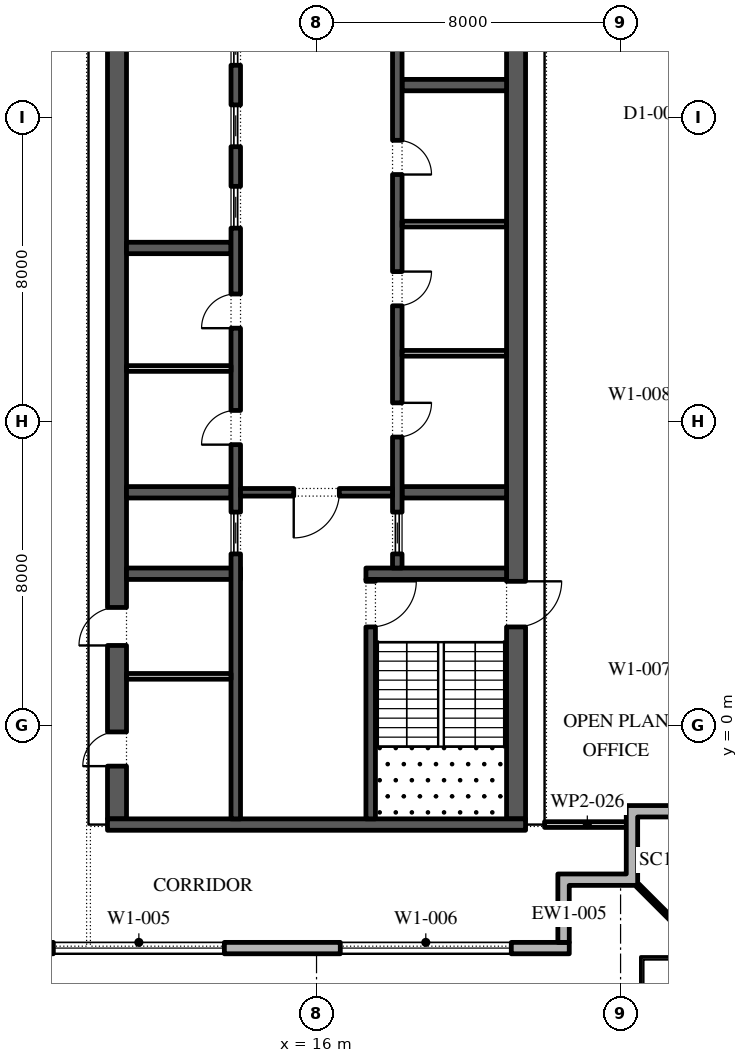
"""IFC4 building model, lengths in metres.
Left out: names, types, materials, properties, quantities, classifications, styles, units other than length and angle.
Written with IfcOpenShell. Run it as: python <this file> out.ifc"""

import sys

from ifc_helpers import new_model, si_unit, direction, frame, frame_2d, origin, place, context, subcontext, project, spatial, polyline, rectangle, outline, extrude, element, fill, save


model = new_model("IFC4")
c1 = context("Model", 3, precision=1e-05, world=origin(), true_north=direction((0.0, 1.0)))
c2 = subcontext(c1, "Body", "Model", "MODEL_VIEW")
j1 = project(units=[si_unit("LENGTHUNIT", "METRE"), si_unit("PLANEANGLEUNIT", "RADIAN")], contexts=[c1])
p1 = place(None, origin())
s1 = spatial("IfcSite", under=j1, at=p1, CompositionType="ELEMENT")
p2 = place(p1, origin())
s2 = spatial("IfcBuilding", under=s1, at=p2, CompositionType="ELEMENT")
p3 = place(p2, frame((0.0, 0.0, 309.0)))
s3 = spatial("IfcBuildingStorey", under=s2, at=p3, CompositionType="ELEMENT", Elevation=309.0)
p4 = place(p3, frame((-22.35, -5.85, 0.0), z_axis=(0.0, 0.0, 1.0), x_axis=(1.0, 0.0, 0.0)))
e1 = element("IfcWall", 1, at=p4, inside=s3, PredefinedType="STANDARD", context=c2, shape_type="SweptSolid", body=[
    extrude(rectangle(XDim=45.0, YDim=0.3, at=frame_2d((22.5, 0.0))), origin(), (0.0, 0.0, 1.0), 4.0),
])
p5 = place(p4, frame((1.375, 0.0, 0.45)))
e2 = element("IfcOpeningElement", 2, at=p5, cuts=e1, PredefinedType="OPENING", context=c2, shape_type="SweptSolid", body=[
    extrude(rectangle(XDim=4.5, YDim=3.05, at=frame_2d((2.25, 1.525))), frame((0.0, 0.16, 0.0), z_axis=(0.0, -1.0, 0.0), x_axis=(1.0, 0.0, 0.0)), (0.0, 0.0, 1.0), 0.32),
])
p6 = place(p4, frame((8.775, 0.0, 0.45)))
e3 = element("IfcOpeningElement", 3, at=p6, cuts=e1, PredefinedType="OPENING", context=c2, shape_type="SweptSolid", body=[
    extrude(rectangle(XDim=4.5, YDim=3.05, at=frame_2d((2.25, 1.525))), frame((0.0, 0.16, 0.0), z_axis=(0.0, -1.0, 0.0), x_axis=(1.0, 0.0, 0.0)), (0.0, 0.0, 1.0), 0.32),
])
p7 = place(p4, frame((17.375, 0.0, 0.0)))
e4 = element("IfcOpeningElement", 4, at=p7, cuts=e1, PredefinedType="OPENING", context=c2, shape_type="SweptSolid", body=[
    extrude(rectangle(XDim=2.4, YDim=3.5, at=frame_2d((1.2, 1.75))), frame((0.0, 0.16, 0.0), z_axis=(0.0, -1.0, 0.0), x_axis=(1.0, 0.0, 0.0)), (0.0, 0.0, 1.0), 0.32),
])
p8 = place(p4, frame((23.875, 0.0, 0.45)))
e5 = element("IfcOpeningElement", 5, at=p8, cuts=e1, PredefinedType="OPENING", context=c2, shape_type="SweptSolid", body=[
    extrude(rectangle(XDim=4.5, YDim=3.05, at=frame_2d((2.25, 1.525))), frame((0.0, 0.16, 0.0), z_axis=(0.0, -1.0, 0.0), x_axis=(1.0, 0.0, 0.0)), (0.0, 0.0, 1.0), 0.32),
])
p9 = place(p4, frame((31.425, 0.0, 0.45)))
e6 = element("IfcOpeningElement", 6, at=p9, cuts=e1, PredefinedType="OPENING", context=c2, shape_type="SweptSolid", body=[
    extrude(rectangle(XDim=4.5, YDim=3.05, at=frame_2d((2.25, 1.525))), frame((0.0, 0.16, 0.0), z_axis=(0.0, -1.0, 0.0), x_axis=(1.0, 0.0, 0.0)), (0.0, 0.0, 1.0), 0.32),
])
p10 = place(p4, frame((38.975, 0.0, 0.45)))
e7 = element("IfcOpeningElement", 7, at=p10, cuts=e1, PredefinedType="OPENING", context=c2, shape_type="SweptSolid", body=[
    extrude(rectangle(XDim=4.5, YDim=3.05, at=frame_2d((2.25, 1.525))), frame((0.0, 0.16, 0.0), z_axis=(0.0, -1.0, 0.0), x_axis=(1.0, 0.0, 0.0)), (0.0, 0.0, 1.0), 0.32),
])
p11 = place(p3, origin())
e8 = element("IfcWall", 8, at=p11, inside=s3, PredefinedType="STANDARD", context=c2, shape_type="SweptSolid", body=[
    extrude(outline(polyline([(24.15, -3.9), (24.15, -2.1), (26.25, -2.1), (26.25, -2.4), (24.45, -2.4), (24.45, -4.2), (22.65, -4.2), (22.65, -5.7), (22.35, -5.7), (22.35, -3.9), (24.15, -3.9)])), origin(), (0.0, 0.0, 1.0), 4.0),
])
p12 = place(p3, frame((24.45, -4.2, -0.05), z_axis=(0.0, 0.0, 1.0), x_axis=(0.707106781187, -0.707106781187, 0.0)))
e9 = element("IfcWall", 9, at=p12, inside=s3, PredefinedType="STANDARD", context=c2, shape_type="SweptSolid", body=[
    extrude(rectangle(XDim=2.667, YDim=0.1, at=frame_2d((1.333, 0.0))), origin(), (0.0, 0.0, 1.0), 4.05),
])
p13 = place(p3, frame((21.25, -2.45, 0.0), z_axis=(0.0, 0.0, 1.0), x_axis=(0.0, 1.0, 0.0)))
e10 = element("IfcWall", 10, at=p13, inside=s3, PredefinedType="SHEAR", context=c2, shape_type="SweptSolid", body=[
    extrude(rectangle(XDim=27.9, YDim=0.5, at=frame_2d((13.95, 0.0))), origin(), (0.0, 0.0, 1.0), 4.0),
])
p14 = place(p13, frame((5.05, 0.0, 0.0)))
e11 = element("IfcOpeningElement", 11, at=p14, cuts=e10, PredefinedType="OPENING", context=c2, shape_type="SweptSolid", body=[
    extrude(rectangle(XDim=1.2, YDim=2.1, at=frame_2d((0.6, 1.05))), frame((0.0, 0.26, 0.0), z_axis=(0.0, -1.0, 0.0), x_axis=(1.0, 0.0, 0.0)), (0.0, 0.0, 1.0), 0.52),
])
p15 = place(p13, frame((21.65, 0.0, 0.0)))
e12 = element("IfcOpeningElement", 12, at=p15, cuts=e10, PredefinedType="OPENING", context=c2, shape_type="SweptSolid", body=[
    extrude(rectangle(XDim=1.2, YDim=2.1, at=frame_2d((0.6, 1.05))), frame((0.0, 0.26, 0.0), z_axis=(0.0, -1.0, 0.0), x_axis=(1.0, 0.0, 0.0)), (0.0, 0.0, 1.0), 0.52),
])
p16 = place(p3, frame((10.75, -2.45, 0.0), z_axis=(0.0, 0.0, 1.0), x_axis=(0.0, 1.0, 0.0)))
e13 = element("IfcWall", 13, at=p16, inside=s3, PredefinedType="SHEAR", context=c2, shape_type="SweptSolid", body=[
    extrude(rectangle(XDim=27.9, YDim=0.5, at=frame_2d((13.95, 0.0))), origin(), (0.0, 0.0, 1.0), 4.0),
])
p17 = place(p16, frame((23.65, 0.0, 0.0)))
e14 = element("IfcOpeningElement", 14, at=p17, cuts=e13, PredefinedType="OPENING", context=c2, shape_type="SweptSolid", body=[
    extrude(rectangle(XDim=2.4, YDim=2.1, at=frame_2d((1.2, 1.05))), frame((0.0, 0.26, 0.0), z_axis=(0.0, -1.0, 0.0), x_axis=(1.0, 0.0, 0.0)), (0.0, 0.0, 1.0), 0.52),
])
p18 = place(p16, frame((1.387, 0.0, 0.0)))
e15 = element("IfcOpeningElement", 15, at=p18, cuts=e13, PredefinedType="OPENING", context=c2, shape_type="SweptSolid", body=[
    extrude(rectangle(XDim=0.9, YDim=2.1, at=frame_2d((0.45, 1.05))), frame((0.0, 0.26, 0.0), z_axis=(0.0, -1.0, 0.0), x_axis=(1.0, 0.0, 0.0)), (0.0, 0.0, 1.0), 0.52),
])
p19 = place(p16, frame((4.562, 0.0, 0.0)))
e16 = element("IfcOpeningElement", 16, at=p19, cuts=e13, PredefinedType="OPENING", context=c2, shape_type="SweptSolid", body=[
    extrude(rectangle(XDim=1.0, YDim=2.1, at=frame_2d((0.5, 1.05))), frame((0.0, 0.26, 0.0), z_axis=(0.0, -1.0, 0.0), x_axis=(1.0, 0.0, 0.0)), (0.0, 0.0, 1.0), 0.52),
])
p20 = place(p3, frame((10.5, -2.6, 0.0), z_axis=(0.0, 0.0, 1.0), x_axis=(1.0, 0.0, 0.0)))
e17 = element("IfcWall", 17, at=p20, inside=s3, PredefinedType="SHEAR", context=c2, shape_type="SweptSolid", body=[
    extrude(rectangle(XDim=11.0, YDim=0.3, at=frame_2d((5.5, 0.0))), origin(), (0.0, 0.0, 1.0), 4.0),
])
p21 = place(p3, frame((17.3, 4.0, 0.0), z_axis=(0.0, 0.0, 1.0), x_axis=(1.0, 0.0, 0.0)))
e18 = element("IfcWall", 18, at=p21, inside=s3, PredefinedType="SHEAR", context=c2, shape_type="SweptSolid", body=[
    extrude(rectangle(XDim=3.7, YDim=0.3, at=frame_2d((1.85, 0.0))), origin(), (0.0, 0.0, 1.0), 4.0),
])
p22 = place(p3, frame((17.425, -2.45, 0.0), z_axis=(0.0, 0.0, 1.0), x_axis=(0.0, 1.0, 0.0)))
e19 = element("IfcWall", 19, at=p22, inside=s3, PredefinedType="SHEAR", context=c2, shape_type="SweptSolid", body=[
    extrude(rectangle(XDim=6.3, YDim=0.25, at=frame_2d((3.15, 0.0))), origin(), (0.0, 0.0, 1.0), 4.0),
])
p23 = place(p22, frame((5.05, 0.0, 0.0)))
e20 = element("IfcOpeningElement", 20, at=p23, cuts=e19, PredefinedType="OPENING", context=c2, shape_type="SweptSolid", body=[
    extrude(rectangle(XDim=1.2, YDim=2.1, at=frame_2d((0.6, 1.05))), frame((0.0, 0.135, 0.0), z_axis=(0.0, -1.0, 0.0), x_axis=(1.0, 0.0, 0.0)), (0.0, 0.0, 1.0), 0.27),
])
for number, where, z_axis, x_axis in (
    (21, (18.25, 6.143, 0.0), (0.0, 0.0, 1.0), (1.0, 0.0, 0.0)),
    (22, (18.25, 16.857, 0.0), (0.0, 0.0, 1.0), (1.0, 0.0, 0.0)),
):
    element("IfcWall", number, at=place(p3, frame(where, z_axis=z_axis, x_axis=x_axis)), inside=s3, PredefinedType="SHEAR", context=c2, shape_type="SweptSolid", body=[
        extrude(rectangle(XDim=2.75, YDim=0.3, at=frame_2d((1.375, 0.0))), origin(), (0.0, 0.0, 1.0), 4.0),
    ])
p24 = place(p3, frame((18.125, 4.15, 0.0), z_axis=(0.0, 0.0, 1.0), x_axis=(0.0, 1.0, 0.0)))
e23 = element("IfcWall", 23, at=p24, inside=s3, PredefinedType="SHEAR", context=c2, shape_type="SweptSolid", body=[
    extrude(rectangle(XDim=14.7, YDim=0.25, at=frame_2d((7.35, 0.0))), origin(), (0.0, 0.0, 1.0), 4.0),
])
p25 = place(p24, frame((3.446, 0.0, 0.0)))
e24 = element("IfcOpeningElement", 24, at=p25, cuts=e23, PredefinedType="OPENING", context=c2, shape_type="SweptSolid", body=[
    extrude(rectangle(XDim=0.9, YDim=2.1, at=frame_2d((0.45, 1.05))), frame((0.0, 0.135, 0.0), z_axis=(0.0, -1.0, 0.0), x_axis=(1.0, 0.0, 0.0)), (0.0, 0.0, 1.0), 0.27),
])
p26 = place(p24, frame((6.9, 0.0, 0.0)))
e25 = element("IfcOpeningElement", 25, at=p26, cuts=e23, PredefinedType="OPENING", context=c2, shape_type="SweptSolid", body=[
    extrude(rectangle(XDim=0.9, YDim=2.1, at=frame_2d((0.45, 1.05))), frame((0.0, 0.135, 0.0), z_axis=(0.0, -1.0, 0.0), x_axis=(1.0, 0.0, 0.0)), (0.0, 0.0, 1.0), 0.27),
])
p27 = place(p24, frame((10.354, 0.0, 0.0)))
e26 = element("IfcOpeningElement", 26, at=p27, cuts=e23, PredefinedType="OPENING", context=c2, shape_type="SweptSolid", body=[
    extrude(rectangle(XDim=0.9, YDim=2.1, at=frame_2d((0.45, 1.05))), frame((0.0, 0.135, 0.0), z_axis=(0.0, -1.0, 0.0), x_axis=(1.0, 0.0, 0.0)), (0.0, 0.0, 1.0), 0.27),
])
p28 = place(p24, frame((0.371, 0.0, 0.0)))
e27 = element("IfcOpeningElement", 27, at=p28, cuts=e23, PredefinedType="OPENING", context=c2, shape_type="SweptSolid", body=[
    extrude(rectangle(XDim=1.1, YDim=2.1, at=frame_2d((0.55, 1.05))), frame((0.0, 0.135, 0.0), z_axis=(0.0, -1.0, 0.0), x_axis=(1.0, 0.0, 0.0)), (0.0, 0.0, 1.0), 0.27),
])
for number, where, z_axis, x_axis in (
    (28, (18.25, 9.8, 0.0), (0.0, 0.0, 1.0), (1.0, 0.0, 0.0)),
    (29, (18.25, 13.2, 0.0), (0.0, 0.0, 1.0), (1.0, 0.0, 0.0)),
):
    element("IfcWall", number, at=place(p3, frame(where, z_axis=z_axis, x_axis=x_axis)), inside=s3, PredefinedType="PARTITIONING", context=c2, shape_type="SweptSolid", body=[
        extrude(rectangle(XDim=2.75, YDim=0.15, at=frame_2d((1.375, 0.0))), origin(), (0.0, 0.0, 1.0), 4.0),
    ])
p29 = place(p3, frame((11.0, 4.0, 0.0), z_axis=(0.0, 0.0, 1.0), x_axis=(1.0, 0.0, 0.0)))
e30 = element("IfcWall", 30, at=p29, inside=s3, PredefinedType="SHEAR", context=c2, shape_type="SweptSolid", body=[
    extrude(rectangle(XDim=3.0, YDim=0.3, at=frame_2d((1.5, 0.0))), origin(), (0.0, 0.0, 1.0), 4.0),
])
for number, where, z_axis, x_axis in (
    (31, (11.0, 6.143, 0.0), (0.0, 0.0, 1.0), (1.0, 0.0, 0.0)),
    (32, (11.0, 12.571, 0.0), (0.0, 0.0, 1.0), (1.0, 0.0, 0.0)),
):
    element("IfcWall", number, at=place(p3, frame(where, z_axis=z_axis, x_axis=x_axis)), inside=s3, PredefinedType="SHEAR", context=c2, shape_type="SweptSolid", body=[
        extrude(rectangle(XDim=2.75, YDim=0.3, at=frame_2d((1.375, 0.0))), origin(), (0.0, 0.0, 1.0), 4.0),
    ])
p30 = place(p3, frame((13.875, -2.45, 0.0), z_axis=(0.0, 0.0, 1.0), x_axis=(0.0, 1.0, 0.0)))
e33 = element("IfcWall", 33, at=p30, inside=s3, PredefinedType="SHEAR", context=c2, shape_type="SweptSolid", body=[
    extrude(rectangle(XDim=21.3, YDim=0.25, at=frame_2d((10.65, 0.0))), origin(), (0.0, 0.0, 1.0), 4.0),
])
p31 = place(p30, frame((9.846, 0.0, 0.0)))
e34 = element("IfcOpeningElement", 34, at=p31, cuts=e33, PredefinedType="OPENING", context=c2, shape_type="SweptSolid", body=[
    extrude(rectangle(XDim=0.9, YDim=2.1, at=frame_2d((0.45, 1.05))), frame((0.0, 0.135, 0.0), z_axis=(0.0, -1.0, 0.0), x_axis=(1.0, 0.0, 0.0)), (0.0, 0.0, 1.0), 0.27),
])
p32 = place(p30, frame((12.911, 0.0, 0.0)))
e35 = element("IfcOpeningElement", 35, at=p32, cuts=e33, PredefinedType="OPENING", context=c2, shape_type="SweptSolid", body=[
    extrude(rectangle(XDim=0.9, YDim=2.1, at=frame_2d((0.45, 1.05))), frame((0.0, 0.135, 0.0), z_axis=(0.0, -1.0, 0.0), x_axis=(1.0, 0.0, 0.0)), (0.0, 0.0, 1.0), 0.27),
])
p33 = place(p30, frame((6.971, 0.0, 0.0)))
e36 = element("IfcOpeningElement", 36, at=p33, cuts=e33, PredefinedType="OPENING", context=c2, shape_type="SweptSolid", body=[
    extrude(rectangle(XDim=1.1, YDim=2.1, at=frame_2d((0.55, 1.05))), frame((0.0, 0.135, 0.0), z_axis=(0.0, -1.0, 0.0), x_axis=(1.0, 0.0, 0.0)), (0.0, 0.0, 1.0), 0.27),
])
p34 = place(p30, frame((15.543, 0.0, 0.0)))
e37 = element("IfcOpeningElement", 37, at=p34, cuts=e33, PredefinedType="OPENING", context=c2, shape_type="SweptSolid", body=[
    extrude(rectangle(XDim=1.1, YDim=2.1, at=frame_2d((0.55, 1.05))), frame((0.0, 0.135, 0.0), z_axis=(0.0, -1.0, 0.0), x_axis=(1.0, 0.0, 0.0)), (0.0, 0.0, 1.0), 0.27),
])
p35 = place(p30, frame((17.686, 0.0, 0.0)))
e38 = element("IfcOpeningElement", 38, at=p35, cuts=e33, PredefinedType="OPENING", context=c2, shape_type="SweptSolid", body=[
    extrude(rectangle(XDim=1.1, YDim=2.1, at=frame_2d((0.55, 1.05))), frame((0.0, 0.135, 0.0), z_axis=(0.0, -1.0, 0.0), x_axis=(1.0, 0.0, 0.0)), (0.0, 0.0, 1.0), 0.27),
])
p36 = place(p30, frame((19.829, 0.0, 0.0)))
e39 = element("IfcOpeningElement", 39, at=p36, cuts=e33, PredefinedType="OPENING", context=c2, shape_type="SweptSolid", body=[
    extrude(rectangle(XDim=1.1, YDim=2.1, at=frame_2d((0.55, 1.05))), frame((0.0, 0.135, 0.0), z_axis=(0.0, -1.0, 0.0), x_axis=(1.0, 0.0, 0.0)), (0.0, 0.0, 1.0), 0.27),
])
p37 = place(p3, frame((11.0, 9.4, 0.0), z_axis=(0.0, 0.0, 1.0), x_axis=(1.0, 0.0, 0.0)))
e40 = element("IfcWall", 40, at=p37, inside=s3, PredefinedType="PARTITIONING", context=c2, shape_type="SweptSolid", body=[
    extrude(rectangle(XDim=2.75, YDim=0.15, at=frame_2d((1.375, 0.0))), origin(), (0.0, 0.0, 1.0), 4.0),
])
p38 = place(p3, frame((14.0, 6.143, 0.0), z_axis=(0.0, 0.0, 1.0), x_axis=(1.0, 0.0, 0.0)))
e41 = element("IfcWall", 41, at=p38, inside=s3, PredefinedType="SHEAR", context=c2, shape_type="SweptSolid", body=[
    extrude(rectangle(XDim=4.0, YDim=0.2, at=frame_2d((2.0, 0.0))), origin(), (0.0, 0.0, 1.0), 4.0),
])
p39 = place(p38, frame((1.4, 0.0, 0.0)))
e42 = element("IfcOpeningElement", 42, at=p39, cuts=e41, PredefinedType="OPENING", context=c2, shape_type="SweptSolid", body=[
    extrude(rectangle(XDim=1.2, YDim=2.1, at=frame_2d((0.6, 1.05))), frame((0.0, 0.11, 0.0), z_axis=(0.0, -1.0, 0.0), x_axis=(1.0, 0.0, 0.0)), (0.0, 0.0, 1.0), 0.22),
])
p40 = place(p3, frame((11.0, 1.3, 0.0), z_axis=(0.0, 0.0, 1.0), x_axis=(1.0, 0.0, 0.0)))
e43 = element("IfcWall", 43, at=p40, inside=s3, PredefinedType="PARTITIONING", context=c2, shape_type="SweptSolid", body=[
    extrude(rectangle(XDim=2.75, YDim=0.15, at=frame_2d((1.375, 0.0))), origin(), (0.0, 0.0, 1.0), 4.0),
])
p41 = place(p3, frame((22.0, -2.6, 0.0), z_axis=(0.0, 0.0, 1.0), x_axis=(1.0, 0.0, 0.0)))
e44 = element("IfcWall", 44, at=p41, inside=s3, PredefinedType="PARTITIONING", context=c2, shape_type="SweptSolid", body=[
    extrude(rectangle(XDim=2.25, YDim=0.15, at=frame_2d((1.125, 0.0))), origin(), (0.0, 0.0, 1.0), 4.0),
])
p42 = place(p9, origin())
e45 = element("IfcWindow", 45, at=p42, inside=s3, PartitioningType="DOUBLE_PANEL_VERTICAL", PredefinedType="WINDOW", context=c2, shape_type="SweptSolid", body=[
    extrude(rectangle(XDim=4.5, YDim=3.05, at=frame_2d((2.25, 1.525))), frame((0.0, 0.03, 0.0), z_axis=(0.0, -1.0, 0.0), x_axis=(1.0, 0.0, 0.0)), (0.0, 0.0, 1.0), 0.06),
])
fill(e6, e45)
p43 = place(p10, origin())
e46 = element("IfcWindow", 46, at=p43, inside=s3, PartitioningType="DOUBLE_PANEL_VERTICAL", PredefinedType="WINDOW", context=c2, shape_type="SweptSolid", body=[
    extrude(rectangle(XDim=4.5, YDim=3.05, at=frame_2d((2.25, 1.525))), frame((0.0, 0.03, 0.0), z_axis=(0.0, -1.0, 0.0), x_axis=(1.0, 0.0, 0.0)), (0.0, 0.0, 1.0), 0.06),
])
fill(e7, e46)
p44 = place(p25, frame((0.9, -0.2, 0.0), z_axis=(0.0, 0.0, 1.0), x_axis=(-1.0, 0.0, 0.0)))
e47 = element("IfcDoor", 47, at=p44, inside=s3, OperationType="SINGLE_SWING_RIGHT", PredefinedType="DOOR", context=c2, shape_type="SweptSolid", body=[
    extrude(rectangle(XDim=0.9, YDim=2.1, at=frame_2d((0.45, 1.05))), frame((0.0, -0.075, 0.0), z_axis=(0.0, -1.0, 0.0), x_axis=(1.0, 0.0, 0.0)), (0.0, 0.0, 1.0), 0.05),
])
fill(e24, e47)
p45 = place(p26, frame((0.9, -0.2, 0.0), z_axis=(0.0, 0.0, 1.0), x_axis=(-1.0, 0.0, 0.0)))
e48 = element("IfcDoor", 48, at=p45, inside=s3, OperationType="SINGLE_SWING_RIGHT", PredefinedType="DOOR", context=c2, shape_type="SweptSolid", body=[
    extrude(rectangle(XDim=0.9, YDim=2.1, at=frame_2d((0.45, 1.05))), frame((0.0, -0.075, 0.0), z_axis=(0.0, -1.0, 0.0), x_axis=(1.0, 0.0, 0.0)), (0.0, 0.0, 1.0), 0.05),
])
fill(e25, e48)
p46 = place(p27, frame((0.9, -0.2, 0.0), z_axis=(0.0, 0.0, 1.0), x_axis=(-1.0, 0.0, 0.0)))
e49 = element("IfcDoor", 49, at=p46, inside=s3, OperationType="SINGLE_SWING_LEFT", PredefinedType="DOOR", context=c2, shape_type="SweptSolid", body=[
    extrude(rectangle(XDim=0.9, YDim=2.1, at=frame_2d((0.45, 1.05))), frame((0.0, -0.075, 0.0), z_axis=(0.0, -1.0, 0.0), x_axis=(1.0, 0.0, 0.0)), (0.0, 0.0, 1.0), 0.05),
])
fill(e26, e49)
p47 = place(p28, origin())
e50 = element("IfcDoor", 50, at=p47, inside=s3, OperationType="SLIDING_TO_LEFT", PredefinedType="DOOR", context=c2, shape_type="SweptSolid", body=[
    extrude(rectangle(XDim=1.1, YDim=2.1, at=frame_2d((0.55, 1.05))), frame((0.0, 0.025, 0.0), z_axis=(0.0, -1.0, 0.0), x_axis=(1.0, 0.0, 0.0)), (0.0, 0.0, 1.0), 0.05),
])
fill(e27, e50)
p48 = place(p31, origin())
e51 = element("IfcDoor", 51, at=p48, inside=s3, OperationType="SINGLE_SWING_RIGHT", PredefinedType="DOOR", context=c2, shape_type="SweptSolid", body=[
    extrude(rectangle(XDim=0.9, YDim=2.1, at=frame_2d((0.45, 1.05))), frame((0.0, 0.125, 0.0), z_axis=(0.0, -1.0, 0.0), x_axis=(1.0, 0.0, 0.0)), (0.0, 0.0, 1.0), 0.05),
])
fill(e34, e51)
p49 = place(p32, origin())
e52 = element("IfcDoor", 52, at=p49, inside=s3, OperationType="SINGLE_SWING_RIGHT", PredefinedType="DOOR", context=c2, shape_type="SweptSolid", body=[
    extrude(rectangle(XDim=0.9, YDim=2.1, at=frame_2d((0.45, 1.05))), frame((0.0, 0.125, 0.0), z_axis=(0.0, -1.0, 0.0), x_axis=(1.0, 0.0, 0.0)), (0.0, 0.0, 1.0), 0.05),
])
fill(e35, e52)
p50 = place(p33, origin())
e53 = element("IfcDoor", 53, at=p50, inside=s3, OperationType="SLIDING_TO_LEFT", PredefinedType="DOOR", context=c2, shape_type="SweptSolid", body=[
    extrude(rectangle(XDim=1.1, YDim=2.1, at=frame_2d((0.55, 1.05))), frame((0.0, 0.025, 0.0), z_axis=(0.0, -1.0, 0.0), x_axis=(1.0, 0.0, 0.0)), (0.0, 0.0, 1.0), 0.05),
])
fill(e36, e53)
p51 = place(p34, origin())
e54 = element("IfcDoor", 54, at=p51, inside=s3, OperationType="SLIDING_TO_LEFT", PredefinedType="DOOR", context=c2, shape_type="SweptSolid", body=[
    extrude(rectangle(XDim=1.1, YDim=2.1, at=frame_2d((0.55, 1.05))), frame((0.0, 0.025, 0.0), z_axis=(0.0, -1.0, 0.0), x_axis=(1.0, 0.0, 0.0)), (0.0, 0.0, 1.0), 0.05),
])
fill(e37, e54)
p52 = place(p35, origin())
e55 = element("IfcDoor", 55, at=p52, inside=s3, OperationType="SLIDING_TO_LEFT", PredefinedType="DOOR", context=c2, shape_type="SweptSolid", body=[
    extrude(rectangle(XDim=1.1, YDim=2.1, at=frame_2d((0.55, 1.05))), frame((0.0, 0.025, 0.0), z_axis=(0.0, -1.0, 0.0), x_axis=(1.0, 0.0, 0.0)), (0.0, 0.0, 1.0), 0.05),
])
fill(e38, e55)
p53 = place(p36, origin())
e56 = element("IfcDoor", 56, at=p53, inside=s3, OperationType="SLIDING_TO_LEFT", PredefinedType="DOOR", context=c2, shape_type="SweptSolid", body=[
    extrude(rectangle(XDim=1.1, YDim=2.1, at=frame_2d((0.55, 1.05))), frame((0.0, 0.025, 0.0), z_axis=(0.0, -1.0, 0.0), x_axis=(1.0, 0.0, 0.0)), (0.0, 0.0, 1.0), 0.05),
])
fill(e39, e56)
p54 = place(p39, frame((1.2, 0.0, 0.0), z_axis=(0.0, 0.0, 1.0), x_axis=(-1.0, 0.0, 0.0)))
e57 = element("IfcDoor", 57, at=p54, inside=s3, OperationType="SINGLE_SWING_LEFT", PredefinedType="DOOR", context=c2, shape_type="SweptSolid", body=[
    extrude(rectangle(XDim=1.2, YDim=2.1, at=frame_2d((0.6, 1.05))), frame((0.0, 0.025, 0.0), z_axis=(0.0, -1.0, 0.0), x_axis=(1.0, 0.0, 0.0)), (0.0, 0.0, 1.0), 0.05),
])
fill(e42, e57)
p55 = place(p23, frame((1.2, 0.0, 0.0), z_axis=(0.0, 0.0, 1.0), x_axis=(-1.0, 0.0, 0.0)))
e58 = element("IfcDoor", 58, at=p55, inside=s3, OperationType="SINGLE_SWING_RIGHT", PredefinedType="DOOR", context=c2, shape_type="SweptSolid", body=[
    extrude(rectangle(XDim=1.2, YDim=2.1, at=frame_2d((0.6, 1.05))), frame((0.0, 0.025, 0.0), z_axis=(0.0, -1.0, 0.0), x_axis=(1.0, 0.0, 0.0)), (0.0, 0.0, 1.0), 0.05),
])
fill(e20, e58)
p56 = place(p14, frame((1.2, 0.0, 0.0), z_axis=(0.0, 0.0, 1.0), x_axis=(-1.0, 0.0, 0.0)))
e59 = element("IfcDoor", 59, at=p56, inside=s3, OperationType="SINGLE_SWING_RIGHT", PredefinedType="DOOR", context=c2, shape_type="SweptSolid", body=[
    extrude(rectangle(XDim=1.2, YDim=2.1, at=frame_2d((0.6, 1.05))), frame((0.0, 0.025, 0.0), z_axis=(0.0, -1.0, 0.0), x_axis=(1.0, 0.0, 0.0)), (0.0, 0.0, 1.0), 0.05),
])
fill(e11, e59)
p57 = place(p18, origin())
e60 = element("IfcDoor", 60, at=p57, inside=s3, OperationType="SINGLE_SWING_RIGHT", PredefinedType="DOOR", context=c2, shape_type="SweptSolid", body=[
    extrude(rectangle(XDim=0.9, YDim=2.1, at=frame_2d((0.45, 1.05))), frame((0.0, -0.2, 0.0), z_axis=(0.0, -1.0, 0.0), x_axis=(1.0, 0.0, 0.0)), (0.0, 0.0, 1.0), 0.05),
])
fill(e15, e60)
p58 = place(p19, origin())
e61 = element("IfcDoor", 61, at=p58, inside=s3, OperationType="SINGLE_SWING_RIGHT", PredefinedType="DOOR", context=c2, shape_type="SweptSolid", body=[
    extrude(rectangle(XDim=1.0, YDim=2.1, at=frame_2d((0.5, 1.05))), frame((0.0, -0.2, 0.0), z_axis=(0.0, -1.0, 0.0), x_axis=(1.0, 0.0, 0.0)), (0.0, 0.0, 1.0), 0.05),
])
fill(e16, e61)
save(model, sys.argv[1])
